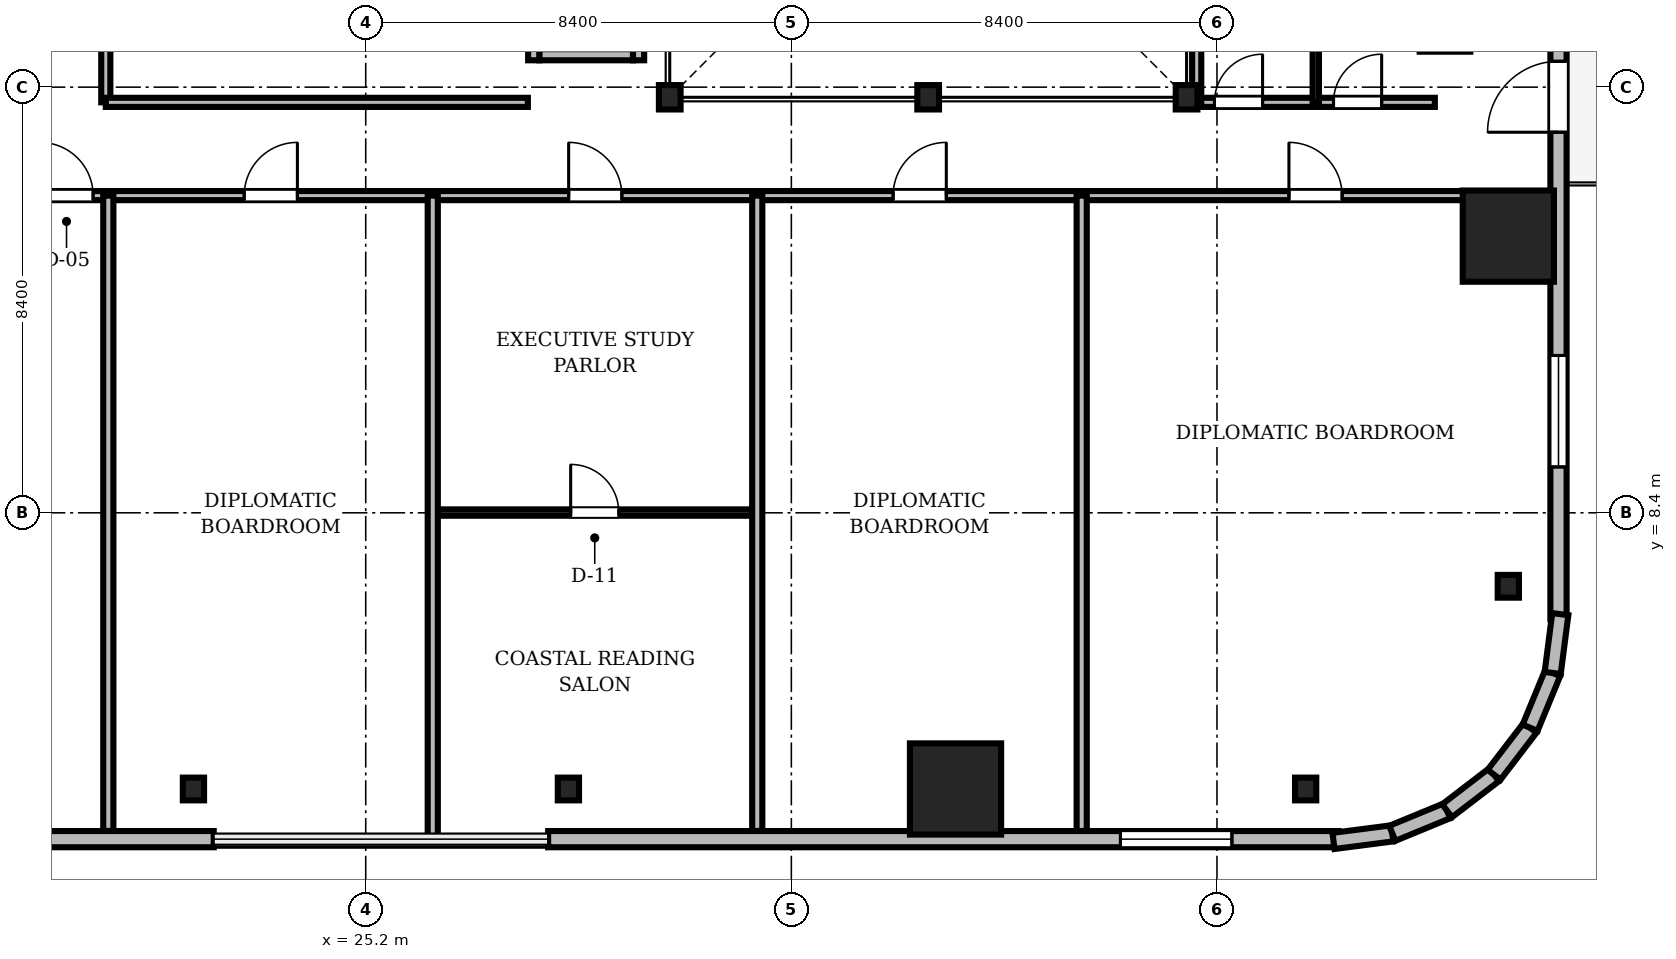
"""IFC4 building model, lengths in metres.
Left out: names, types, materials, properties, quantities, classifications, styles, units other than length and angle.
Written with IfcOpenShell. Run it as: python <this file> out.ifc"""

import sys

from ifc_helpers import new_model, si_unit, direction, frame, frame_2d, origin, origin_2d, place, context, subcontext, project, spatial, rectangle, i_section, extrude, source, transform, mapped, element, fill, save


model = new_model("IFC4")
c1 = context("Model", 3, precision=1e-05, world=origin(), true_north=direction((0.0, 1.0)))
c2 = subcontext(c1, "Body", "Model", "MODEL_VIEW")
j1 = project(units=[si_unit("LENGTHUNIT", "METRE"), si_unit("PLANEANGLEUNIT", "RADIAN")], contexts=[c1])
p1 = place(None, origin())
s1 = spatial("IfcSite", under=j1, at=p1, CompositionType="ELEMENT")
p2 = place(p1, origin())
s2 = spatial("IfcBuilding", under=s1, at=p2, CompositionType="ELEMENT")
p3 = place(p2, frame((0.0, 0.0, 31.25)))
s3 = spatial("IfcBuildingStorey", under=s2, at=p3, CompositionType="ELEMENT", Elevation=31.25)
m1 = source(origin(), c2, "Body", "SweptSolid", [
    extrude(i_section(OverallWidth=0.428, OverallDepth=0.481, WebThickness=0.04, FlangeThickness=0.063, FilletRadius=0.015, at=origin_2d()), origin(), (0.0, 0.0, 1.0), 3.41),
])
for number, where, z_axis, x_axis in (
    (1, (31.2, 16.6, 0.0), (0.0, 0.0, 1.0), (1.0, 0.0, 0.0)),
    (2, (36.3, 16.6, 0.0), (0.0, 0.0, 1.0), (1.0, 0.0, 0.0)),
    (3, (41.4, 16.6, 0.0), (0.0, 0.0, 1.0), (1.0, 0.0, 0.0)),
):
    element("IfcColumn", number, at=place(p3, frame(where, z_axis=z_axis, x_axis=x_axis)), inside=s3, PredefinedType="COLUMN", context=c2, shape_type="MappedRepresentation", body=[
        mapped(m1, transform((0.0, 0.0, 0.0), scale=1.0)),
    ])
m2 = source(origin(), c2, "Body", "SweptSolid", [
    extrude(rectangle(XDim=1.8, YDim=1.8, at=origin_2d()), origin(), (0.0, 0.0, 1.0), 3.41),
])
for number, where, z_axis, x_axis in (
    (4, (36.84, 2.95, 0.0), (0.0, 0.0, 1.0), (1.0, 0.0, 0.0)),
    (5, (47.75, 13.86, 0.0), (0.0, 0.0, 1.0), (1.0, 0.0, 0.0)),
):
    element("IfcColumn", number, at=place(p3, frame(where, z_axis=z_axis, x_axis=x_axis)), inside=s3, PredefinedType="COLUMN", context=c2, shape_type="MappedRepresentation", body=[
        mapped(m2, transform((0.0, 0.0, 0.0), scale=1.0)),
    ])
m3 = source(origin(), c2, "Body", "SweptSolid", [
    extrude(i_section(OverallWidth=0.419, OverallDepth=0.449, WebThickness=0.031, FlangeThickness=0.048, FilletRadius=0.015, at=origin_2d()), origin(), (0.0, 0.0, 1.0), 3.41),
])
for number, where, z_axis, x_axis in (
    (6, (21.8, 2.95, 0.0), (0.0, 0.0, 1.0), (1.0, 0.0, 0.0)),
    (7, (29.2, 2.95, 0.0), (0.0, 0.0, 1.0), (1.0, 0.0, 0.0)),
    (8, (43.75, 2.95, 0.0), (0.0, 0.0, 1.0), (1.0, 0.0, 0.0)),
    (9, (47.75, 6.95, 0.0), (0.0, 0.0, 1.0), (1.0, 0.0, 0.0)),
):
    element("IfcColumn", number, at=place(p3, frame(where, z_axis=z_axis, x_axis=x_axis)), inside=s3, PredefinedType="COLUMN", context=c2, shape_type="MappedRepresentation", body=[
        mapped(m3, transform((0.0, 0.0, 0.0), scale=1.0)),
    ])
m4 = source(origin(), c2, "Body", "SweptSolid", [
    extrude(rectangle(XDim=15.6, YDim=0.32, at=frame_2d((7.8, 0.0))), origin(), (0.0, 0.0, 1.0), 3.41),
])
p4 = place(p3, frame((6.6, 1.96, 0.0), z_axis=(0.0, 0.0, 1.0), x_axis=(1.0, 0.0, 0.0)))
e10 = element("IfcWall", 10, at=p4, inside=s3, PredefinedType="SOLIDWALL", context=c2, shape_type="MappedRepresentation", body=[
    mapped(m4, transform((0.0, 0.0, 0.0), scale=1.0)),
])
m5 = source(origin(), c2, "Body", "SweptSolid", [
    extrude(rectangle(XDim=1.4, YDim=2.3, at=frame_2d((0.7, 1.15))), frame((0.0, 0.17, 0.0), z_axis=(0.0, -1.0, 0.0), x_axis=(1.0, 0.0, 0.0)), (0.0, 0.0, 1.0), 0.34),
])
p5 = place(p4, frame((9.61, 0.0, 0.0)))
e11 = element("IfcOpeningElement", 11, at=p5, cuts=e10, PredefinedType="OPENING", context=c2, shape_type="MappedRepresentation", body=[
    mapped(m5, transform((0.0, 0.0, 0.0), scale=1.0)),
])
m6 = source(origin(), c2, "Body", "SweptSolid", [
    extrude(rectangle(XDim=2.2, YDim=2.4, at=frame_2d((1.1, 1.2))), frame((0.0, 0.17, 0.0), z_axis=(0.0, -1.0, 0.0), x_axis=(1.0, 0.0, 0.0)), (0.0, 0.0, 1.0), 0.34),
])
p6 = place(p4, frame((3.005, 0.0, 0.72)))
e12 = element("IfcOpeningElement", 12, at=p6, cuts=e10, PredefinedType="OPENING", context=c2, shape_type="MappedRepresentation", body=[
    mapped(m6, transform((0.0, 0.0, 0.0), scale=1.0)),
])
p7 = place(p3, frame((28.8, 1.96, 0.0), z_axis=(0.0, 0.0, 1.0), x_axis=(1.0, 0.0, 0.0)))
e13 = element("IfcWall", 13, at=p7, inside=s3, PredefinedType="SOLIDWALL", context=c2, shape_type="MappedRepresentation", body=[
    mapped(m4, transform((0.0, 0.0, 0.0), scale=1.0)),
])
p8 = place(p7, frame((11.295, 0.0, 0.72)))
e14 = element("IfcOpeningElement", 14, at=p8, cuts=e13, PredefinedType="OPENING", context=c2, shape_type="MappedRepresentation", body=[
    mapped(m6, transform((0.0, 0.0, 0.0), scale=1.0)),
])
p9 = place(p3, frame((48.74, 6.3, 0.0), z_axis=(0.0, 0.0, 1.0), x_axis=(0.0, 1.0, 0.0)))
e15 = element("IfcWall", 15, at=p9, inside=s3, PredefinedType="SOLIDWALL", context=c2, shape_type="MappedRepresentation", body=[
    mapped(m4, transform((0.0, 0.0, 0.0), scale=1.0)),
])
p10 = place(p9, frame((9.61, 0.0, 0.0)))
e16 = element("IfcOpeningElement", 16, at=p10, cuts=e15, PredefinedType="OPENING", context=c2, shape_type="MappedRepresentation", body=[
    mapped(m5, transform((0.0, 0.0, 0.0), scale=1.0)),
])
p11 = place(p9, frame((3.005, 0.0, 0.72)))
e17 = element("IfcOpeningElement", 17, at=p11, cuts=e15, PredefinedType="OPENING", context=c2, shape_type="MappedRepresentation", body=[
    mapped(m6, transform((0.0, 0.0, 0.0), scale=1.0)),
])
m7 = source(origin(), c2, "Body", "SweptSolid", [
    extrude(rectangle(XDim=1.17, YDim=0.32, at=frame_2d((0.585, 0.0))), origin(), (0.0, 0.0, 1.0), 3.41),
])
p12 = place(p3, frame((44.3, 1.925, 0.0), z_axis=(0.0, 0.0, 1.0), x_axis=(0.991762485493, 0.128090485085, 0.0)))
e18 = element("IfcWall", 18, at=p12, inside=s3, PredefinedType="SOLIDWALL", context=c2, shape_type="MappedRepresentation", body=[
    mapped(m7, transform((0.0, 0.0, 0.0), scale=1.0)),
])
m8 = source(origin(), c2, "Body", "SweptSolid", [
    extrude(rectangle(XDim=1.169, YDim=0.32, at=frame_2d((0.585, 0.0))), origin(), (0.0, 0.0, 1.0), 3.41),
])
p13 = place(p3, frame((45.46, 2.074, 0.0), z_axis=(0.0, 0.0, 1.0), x_axis=(0.924479075121, 0.381232789334, 0.0)))
e19 = element("IfcWall", 19, at=p13, inside=s3, PredefinedType="SOLIDWALL", context=c2, shape_type="MappedRepresentation", body=[
    mapped(m8, transform((0.0, 0.0, 0.0), scale=1.0)),
])
m9 = source(origin(), c2, "Body", "SweptSolid", [
    extrude(rectangle(XDim=1.169, YDim=0.32, at=frame_2d((0.584, 0.0))), origin(), (0.0, 0.0, 1.0), 3.41),
])
p14 = place(p3, frame((46.541, 2.52, 0.0), z_axis=(0.0, 0.0, 1.0), x_axis=(0.793663520347, 0.608356981114, 0.0)))
e20 = element("IfcWall", 20, at=p14, inside=s3, PredefinedType="SOLIDWALL", context=c2, shape_type="MappedRepresentation", body=[
    mapped(m9, transform((0.0, 0.0, 0.0), scale=1.0)),
])
m10 = source(origin(), c2, "Body", "SweptSolid", [
    extrude(rectangle(XDim=1.169, YDim=0.32, at=frame_2d((0.584, 0.0))), origin(), (0.0, 0.0, 1.0), 3.41),
])
for number, where, z_axis, x_axis in (
    (21, (47.469, 3.231, 0.0), (0.0, 0.0, 1.0), (0.608, 0.794, 0.0)),
    (22, (48.18, 4.159, 0.0), (0.0, 0.0, 1.0), (0.381, 0.925, 0.0)),
):
    element("IfcWall", number, at=place(p3, frame(where, z_axis=z_axis, x_axis=x_axis)), inside=s3, PredefinedType="SOLIDWALL", context=c2, shape_type="MappedRepresentation", body=[
        mapped(m10, transform((0.0, 0.0, 0.0), scale=1.0)),
    ])
m11 = source(origin(), c2, "Body", "SweptSolid", [
    extrude(rectangle(XDim=1.171, YDim=0.32, at=frame_2d((0.585, 0.0))), origin(), (0.0, 0.0, 1.0), 3.41),
])
p15 = place(p3, frame((48.625, 5.24, 0.0), z_axis=(0.0, 0.0, 1.0), x_axis=(0.128269133229, 0.991739395941, 0.0)))
e23 = element("IfcWall", 23, at=p15, inside=s3, PredefinedType="SOLIDWALL", context=c2, shape_type="MappedRepresentation", body=[
    mapped(m11, transform((0.0, 0.0, 0.0), scale=1.0)),
])
m12 = source(origin(), c2, "Body", "SweptSolid", [
    extrude(rectangle(XDim=1.85, YDim=0.22, at=frame_2d((0.925, 0.0))), origin(), (0.0, 0.0, 1.0), 3.41),
])
p16 = place(p3, frame((28.625, 17.44, 0.0), z_axis=(0.0, 0.0, 1.0), x_axis=(1.0, 0.0, 0.0)))
e24 = element("IfcWall", 24, at=p16, inside=s3, PredefinedType="SOLIDWALL", context=c2, shape_type="MappedRepresentation", body=[
    mapped(m12, transform((0.0, 0.0, 0.0), scale=1.0)),
])
m13 = source(origin(), c2, "Body", "SweptSolid", [
    extrude(rectangle(XDim=2.54, YDim=0.22, at=frame_2d((1.27, 0.0))), origin(), (0.0, 0.0, 1.0), 3.41),
])
for number, where, z_axis, x_axis in (
    (25, (28.515, 17.33, 0.0), (0.0, 0.0, 1.0), (0.0, 1.0, 0.0)),
    (26, (30.585, 17.33, 0.0), (0.0, 0.0, 1.0), (0.0, 1.0, 0.0)),
):
    element("IfcWall", number, at=place(p3, frame(where, z_axis=z_axis, x_axis=x_axis)), inside=s3, PredefinedType="SOLIDWALL", context=c2, shape_type="MappedRepresentation", body=[
        mapped(m13, transform((0.0, 0.0, 0.0), scale=1.0)),
    ])
m14 = source(origin(), c2, "Body", "SweptSolid", [
    extrude(rectangle(XDim=46.156, YDim=0.18, at=frame_2d((23.078, 0.0))), origin(), (0.0, 0.0, 1.0), 2.652),
])
p17 = place(p3, frame((2.422, 14.66, 0.0), z_axis=(0.0, 0.0, 1.0), x_axis=(1.0, 0.0, 0.0)))
e27 = element("IfcWall", 27, at=p17, inside=s3, PredefinedType="PARTITIONING", context=c2, shape_type="MappedRepresentation", body=[
    mapped(m14, transform((0.0, 0.0, 0.0), scale=1.0)),
])
m15 = source(origin(), c2, "Body", "SweptSolid", [
    extrude(rectangle(XDim=1.05, YDim=2.2, at=frame_2d((0.525, 1.1))), frame((0.0, 0.1, 0.0), z_axis=(0.0, -1.0, 0.0), x_axis=(1.0, 0.0, 0.0)), (0.0, 0.0, 1.0), 0.2),
])
p18 = place(p17, frame((16.348, 0.0, 0.0)))
e28 = element("IfcOpeningElement", 28, at=p18, cuts=e27, PredefinedType="OPENING", context=c2, shape_type="MappedRepresentation", body=[
    mapped(m15, transform((0.0, 0.0, 0.0), scale=1.0)),
])
p19 = place(p17, frame((20.38, 0.0, 0.0)))
e29 = element("IfcOpeningElement", 29, at=p19, cuts=e27, PredefinedType="OPENING", context=c2, shape_type="MappedRepresentation", body=[
    mapped(m15, transform((0.0, 0.0, 0.0), scale=1.0)),
])
p20 = place(p17, frame((26.783, 0.0, 0.0)))
e30 = element("IfcOpeningElement", 30, at=p20, cuts=e27, PredefinedType="OPENING", context=c2, shape_type="MappedRepresentation", body=[
    mapped(m15, transform((0.0, 0.0, 0.0), scale=1.0)),
])
p21 = place(p17, frame((33.186, 0.0, 0.0)))
e31 = element("IfcOpeningElement", 31, at=p21, cuts=e27, PredefinedType="OPENING", context=c2, shape_type="MappedRepresentation", body=[
    mapped(m15, transform((0.0, 0.0, 0.0), scale=1.0)),
])
p22 = place(p17, frame((40.998, 0.0, 0.0)))
e32 = element("IfcOpeningElement", 32, at=p22, cuts=e27, PredefinedType="OPENING", context=c2, shape_type="MappedRepresentation", body=[
    mapped(m15, transform((0.0, 0.0, 0.0), scale=1.0)),
])
m16 = source(origin(), c2, "Body", "SweptSolid", [
    extrude(rectangle(XDim=6.404, YDim=0.125, at=frame_2d((3.202, 0.0))), origin(), (0.0, 0.0, 1.0), 2.802),
])
p23 = place(p3, frame((26.523, 8.405, 0.0), z_axis=(0.0, 0.0, 1.0), x_axis=(1.0, 0.0, 0.0)))
e33 = element("IfcWall", 33, at=p23, inside=s3, PredefinedType="PARTITIONING", context=c2, shape_type="MappedRepresentation", body=[
    mapped(m16, transform((0.0, 0.0, 0.0), scale=1.0)),
])
m17 = source(origin(), c2, "Body", "SweptSolid", [
    extrude(rectangle(XDim=0.95, YDim=2.15, at=frame_2d((0.475, 1.075))), frame((0.0, 0.073, 0.0), z_axis=(0.0, -1.0, 0.0), x_axis=(1.0, 0.0, 0.0)), (0.0, 0.0, 1.0), 0.145),
])
p24 = place(p23, frame((2.722, 0.0, 0.0)))
e34 = element("IfcOpeningElement", 34, at=p24, cuts=e33, PredefinedType="OPENING", context=c2, shape_type="MappedRepresentation", body=[
    mapped(m17, transform((0.0, 0.0, 0.0), scale=1.0)),
])
m18 = source(origin(), c2, "Body", "SweptSolid", [
    extrude(rectangle(XDim=5.4, YDim=0.18, at=frame_2d((2.7, 0.0))), origin(), (0.0, 0.0, 1.0), 2.802),
])
p25 = place(p3, frame((20.07, 16.5, 0.0), z_axis=(0.0, 0.0, 1.0), x_axis=(0.0, 1.0, 0.0)))
e35 = element("IfcWall", 35, at=p25, inside=s3, PredefinedType="PARTITIONING", context=c2, shape_type="MappedRepresentation", body=[
    mapped(m18, transform((0.0, 0.0, 0.0), scale=1.0)),
])
p26 = place(p25, frame((2.0, 0.0, 0.0)))
e36 = element("IfcOpeningElement", 36, at=p26, cuts=e35, PredefinedType="OPENING", context=c2, shape_type="MappedRepresentation", body=[
    mapped(m15, transform((0.0, 0.0, 0.0), scale=1.0)),
])
m19 = source(origin(), c2, "Body", "SweptSolid", [
    extrude(rectangle(XDim=4.7, YDim=0.18, at=frame_2d((2.35, 0.0))), origin(), (0.0, 0.0, 1.0), 2.802),
])
p27 = place(p3, frame((41.6, 16.5, 0.0), z_axis=(0.0, 0.0, 1.0), x_axis=(1.0, 0.0, 0.0)))
e37 = element("IfcWall", 37, at=p27, inside=s3, PredefinedType="PARTITIONING", context=c2, shape_type="MappedRepresentation", body=[
    mapped(m19, transform((0.0, 0.0, 0.0), scale=1.0)),
])
m20 = source(origin(), c2, "Body", "SweptSolid", [
    extrude(rectangle(XDim=0.95, YDim=2.15, at=frame_2d((0.475, 1.075))), frame((0.0, 0.1, 0.0), z_axis=(0.0, -1.0, 0.0), x_axis=(1.0, 0.0, 0.0)), (0.0, 0.0, 1.0), 0.2),
])
p28 = place(p27, frame((0.35, 0.0, 0.0)))
e38 = element("IfcOpeningElement", 38, at=p28, cuts=e37, PredefinedType="OPENING", context=c2, shape_type="MappedRepresentation", body=[
    mapped(m20, transform((0.0, 0.0, 0.0), scale=1.0)),
])
p29 = place(p27, frame((2.7, 0.0, 0.0)))
e39 = element("IfcOpeningElement", 39, at=p29, cuts=e37, PredefinedType="OPENING", context=c2, shape_type="MappedRepresentation", body=[
    mapped(m20, transform((0.0, 0.0, 0.0), scale=1.0)),
])
m21 = source(origin(), c2, "Body", "SweptSolid", [
    extrude(rectangle(XDim=12.538, YDim=0.2, at=frame_2d((6.269, 0.0))), origin(), (0.0, 0.0, 1.0), 2.652),
])
p30 = place(p3, frame((20.12, 2.122, 0.0), z_axis=(0.0, 0.0, 1.0), x_axis=(0.0, 1.0, 0.0)))
e40 = element("IfcWall", 40, at=p30, inside=s3, PredefinedType="PARTITIONING", context=c2, shape_type="MappedRepresentation", body=[
    mapped(m21, transform((0.0, 0.0, 0.0), scale=1.0)),
])
m22 = source(origin(), c2, "Body", "SweptSolid", [
    extrude(rectangle(XDim=12.73, YDim=0.2, at=frame_2d((6.365, 0.0))), origin(), (0.0, 0.0, 1.0), 2.652),
])
p31 = place(p3, frame((26.523, 1.93, 0.0), z_axis=(0.0, 0.0, 1.0), x_axis=(0.0, 1.0, 0.0)))
e41 = element("IfcWall", 41, at=p31, inside=s3, PredefinedType="PARTITIONING", context=c2, shape_type="MappedRepresentation", body=[
    mapped(m22, transform((0.0, 0.0, 0.0), scale=1.0)),
])
for number, where, z_axis, x_axis in (
    (42, (32.927, 2.122, 0.0), (0.0, 0.0, 1.0), (0.0, 1.0, 0.0)),
    (43, (39.33, 2.122, 0.0), (0.0, 0.0, 1.0), (0.0, 1.0, 0.0)),
):
    element("IfcWall", number, at=place(p3, frame(where, z_axis=z_axis, x_axis=x_axis)), inside=s3, PredefinedType="PARTITIONING", context=c2, shape_type="MappedRepresentation", body=[
        mapped(m21, transform((0.0, 0.0, 0.0), scale=1.0)),
    ])
m23 = source(origin(), c2, "Body", "SweptSolid", [
    extrude(rectangle(XDim=8.33, YDim=0.18, at=frame_2d((4.165, 0.0))), origin(), (0.0, 0.0, 1.0), 2.802),
])
p32 = place(p3, frame((20.07, 16.5, 0.0), z_axis=(0.0, 0.0, 1.0), x_axis=(1.0, 0.0, 0.0)))
e44 = element("IfcWall", 44, at=p32, inside=s3, PredefinedType="PARTITIONING", context=c2, shape_type="MappedRepresentation", body=[
    mapped(m23, transform((0.0, 0.0, 0.0), scale=1.0)),
])
m24 = source(origin(), c2, "Body", "SweptSolid", [
    extrude(rectangle(XDim=7.15, YDim=0.18, at=frame_2d((3.575, 0.0))), origin(), (0.0, 0.0, 1.0), 2.802),
])
p33 = place(p3, frame((41.6, 16.5, 0.0), z_axis=(0.0, 0.0, 1.0), x_axis=(0.0, 1.0, 0.0)))
e45 = element("IfcWall", 45, at=p33, inside=s3, PredefinedType="PARTITIONING", context=c2, shape_type="MappedRepresentation", body=[
    mapped(m24, transform((0.0, 0.0, 0.0), scale=1.0)),
])
m25 = source(origin(), c2, "Body", "SweptSolid", [
    extrude(rectangle(XDim=7.15, YDim=0.125, at=frame_2d((3.575, 0.0))), origin(), (0.0, 0.0, 1.0), 2.802),
])
p34 = place(p3, frame((43.95, 16.5, 0.0), z_axis=(0.0, 0.0, 1.0), x_axis=(0.0, 1.0, 0.0)))
e46 = element("IfcWall", 46, at=p34, inside=s3, PredefinedType="PARTITIONING", context=c2, shape_type="MappedRepresentation", body=[
    mapped(m25, transform((0.0, 0.0, 0.0), scale=1.0)),
])
m26 = source(origin(), c2, "Body", "SweptSolid", [
    extrude(rectangle(XDim=2.2, YDim=2.4, at=frame_2d((1.1, 1.2))), frame((0.0, 0.03, 0.0), z_axis=(0.0, -1.0, 0.0), x_axis=(1.0, 0.0, 0.0)), (0.0, 0.0, 1.0), 0.06),
])
p35 = place(p8, origin())
e47 = element("IfcWindow", 47, at=p35, inside=s3, PartitioningType="SINGLE_PANEL", PredefinedType="WINDOW", context=c2, shape_type="MappedRepresentation", body=[
    mapped(m26, transform((0.0, 0.0, 0.0), scale=1.0)),
])
fill(e14, e47)
m27 = source(origin(), c2, "Body", "SweptSolid", [
    extrude(rectangle(XDim=1.4, YDim=2.3, at=frame_2d((0.7, 1.15))), frame((0.0, 0.025, 0.0), z_axis=(0.0, -1.0, 0.0), x_axis=(1.0, 0.0, 0.0)), (0.0, 0.0, 1.0), 0.05),
])
p36 = place(p10, frame((1.4, 0.0, 0.0), z_axis=(0.0, 0.0, 1.0), x_axis=(-1.0, 0.0, 0.0)))
e48 = element("IfcDoor", 48, at=p36, inside=s3, OperationType="DOUBLE_DOOR_SLIDING", PredefinedType="DOOR", context=c2, shape_type="MappedRepresentation", body=[
    mapped(m27, transform((0.0, 0.0, 0.0), scale=1.0)),
])
fill(e16, e48)
p37 = place(p11, origin())
e49 = element("IfcWindow", 49, at=p37, inside=s3, PartitioningType="SINGLE_PANEL", PredefinedType="WINDOW", context=c2, shape_type="MappedRepresentation", body=[
    mapped(m26, transform((0.0, 0.0, 0.0), scale=1.0)),
])
fill(e17, e49)
m28 = source(origin(), c2, "Body", "SweptSolid", [
    extrude(rectangle(XDim=1.05, YDim=2.2, at=frame_2d((0.525, 1.1))), frame((0.0, 0.025, 0.0), z_axis=(0.0, -1.0, 0.0), x_axis=(1.0, 0.0, 0.0)), (0.0, 0.0, 1.0), 0.05),
])
p38 = place(p18, origin())
e50 = element("IfcDoor", 50, at=p38, inside=s3, OperationType="SINGLE_SWING_LEFT", PredefinedType="DOOR", context=c2, shape_type="MappedRepresentation", body=[
    mapped(m28, transform((0.0, 0.0, 0.0), scale=1.0)),
])
fill(e28, e50)
p39 = place(p19, origin())
e51 = element("IfcDoor", 51, at=p39, inside=s3, OperationType="SINGLE_SWING_RIGHT", PredefinedType="DOOR", context=c2, shape_type="MappedRepresentation", body=[
    mapped(m28, transform((0.0, 0.0, 0.0), scale=1.0)),
])
fill(e29, e51)
p40 = place(p20, origin())
e52 = element("IfcDoor", 52, at=p40, inside=s3, OperationType="SINGLE_SWING_LEFT", PredefinedType="DOOR", context=c2, shape_type="MappedRepresentation", body=[
    mapped(m28, transform((0.0, 0.0, 0.0), scale=1.0)),
])
fill(e30, e52)
p41 = place(p21, origin())
e53 = element("IfcDoor", 53, at=p41, inside=s3, OperationType="SINGLE_SWING_RIGHT", PredefinedType="DOOR", context=c2, shape_type="MappedRepresentation", body=[
    mapped(m28, transform((0.0, 0.0, 0.0), scale=1.0)),
])
fill(e31, e53)
p42 = place(p22, origin())
e54 = element("IfcDoor", 54, at=p42, inside=s3, OperationType="SINGLE_SWING_LEFT", PredefinedType="DOOR", context=c2, shape_type="MappedRepresentation", body=[
    mapped(m28, transform((0.0, 0.0, 0.0), scale=1.0)),
])
fill(e32, e54)
m29 = source(origin(), c2, "Body", "SweptSolid", [
    extrude(rectangle(XDim=0.95, YDim=2.15, at=frame_2d((0.475, 1.075))), frame((0.0, 0.025, 0.0), z_axis=(0.0, -1.0, 0.0), x_axis=(1.0, 0.0, 0.0)), (0.0, 0.0, 1.0), 0.05),
])
p43 = place(p24, origin())
e55 = element("IfcDoor", 55, at=p43, inside=s3, OperationType="SINGLE_SWING_LEFT", PredefinedType="DOOR", context=c2, shape_type="MappedRepresentation", body=[
    mapped(m29, transform((0.0, 0.0, 0.0), scale=1.0)),
])
fill(e34, e55)
p44 = place(p28, origin())
e56 = element("IfcDoor", 56, at=p44, inside=s3, OperationType="SINGLE_SWING_RIGHT", PredefinedType="DOOR", context=c2, shape_type="MappedRepresentation", body=[
    mapped(m29, transform((0.0, 0.0, 0.0), scale=1.0)),
])
fill(e38, e56)
p45 = place(p29, origin())
e57 = element("IfcDoor", 57, at=p45, inside=s3, OperationType="SINGLE_SWING_RIGHT", PredefinedType="DOOR", context=c2, shape_type="MappedRepresentation", body=[
    mapped(m29, transform((0.0, 0.0, 0.0), scale=1.0)),
])
fill(e39, e57)
save(model, sys.argv[1])
